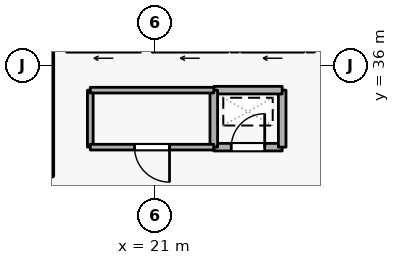
"""IFC4 building model, lengths in metres.
Left out: names, types, materials, properties, quantities, classifications, styles, units other than length and angle.
Written with IfcOpenShell. Run it as: python <this file> out.ifc"""

import sys

from ifc_helpers import new_model, si_unit, direction, frame, frame_2d, origin, place, context, subcontext, project, spatial, rectangle, extrude, element, fill, save


model = new_model("IFC4")
c1 = context("Model", 3, precision=1e-05, world=origin(), true_north=direction((0.0, 1.0)))
c2 = subcontext(c1, "Body", "Model", "MODEL_VIEW")
j1 = project(units=[si_unit("LENGTHUNIT", "METRE"), si_unit("PLANEANGLEUNIT", "RADIAN")], contexts=[c1])
p1 = place(None, origin())
s1 = spatial("IfcSite", under=j1, at=p1, CompositionType="ELEMENT")
p2 = place(p1, origin())
s2 = spatial("IfcBuilding", under=s1, at=p2, CompositionType="ELEMENT")
p3 = place(p2, origin())
s3 = spatial("IfcBuildingStorey", under=s2, at=p3, CompositionType="ELEMENT", Elevation=0.0)
p4 = place(p3, frame((24.92, 36.45, 0.0), z_axis=(0.0, 0.0, 1.0), x_axis=(-1.0, 0.0, 0.0)))
e1 = element("IfcWall", 1, at=p4, inside=s3, PredefinedType="STANDARD", context=c2, shape_type="SweptSolid", body=[
    extrude(rectangle(XDim=1.64, YDim=0.2, at=frame_2d((0.82, 0.0))), origin(), (0.0, 0.0, 1.0), 4.46),
])
p5 = place(p4, frame((0.31, 0.0, 0.0)))
e2 = element("IfcOpeningElement", 2, at=p5, cuts=e1, PredefinedType="OPENING", context=c2, shape_type="SweptSolid", body=[
    extrude(rectangle(XDim=1.02, YDim=2.06, at=frame_2d((0.51, 1.03))), frame((0.0, 0.11, 0.0), z_axis=(0.0, -1.0, 0.0), x_axis=(1.0, 0.0, 0.0)), (0.0, 0.0, 1.0), 0.22),
])
p6 = place(p3, frame((22.92, 36.45, 0.0), z_axis=(0.0, 0.0, 1.0), x_axis=(-1.0, 0.0, 0.0)))
e3 = element("IfcWall", 3, at=p6, inside=s3, PredefinedType="STANDARD", context=c2, shape_type="SweptSolid", body=[
    extrude(rectangle(XDim=1.99, YDim=0.2, at=frame_2d((0.995, 0.0))), origin(), (0.0, 0.0, 1.0), 4.46),
])
p7 = place(p6, frame((0.485, 0.0, 0.0)))
e4 = element("IfcOpeningElement", 4, at=p7, cuts=e3, PredefinedType="OPENING", context=c2, shape_type="SweptSolid", body=[
    extrude(rectangle(XDim=1.02, YDim=2.06, at=frame_2d((0.51, 1.03))), frame((0.0, 0.11, 0.0), z_axis=(0.0, -1.0, 0.0), x_axis=(1.0, 0.0, 0.0)), (0.0, 0.0, 1.0), 0.22),
])
p8 = place(p3, frame((20.62, 36.45, 0.0), z_axis=(0.0, 0.0, 1.0), x_axis=(-1.0, 0.0, 0.0)))
e5 = element("IfcWall", 5, at=p8, inside=s3, PredefinedType="STANDARD", context=c2, shape_type="SweptSolid", body=[
    extrude(rectangle(XDim=1.94, YDim=0.2, at=frame_2d((0.97, 0.0))), origin(), (0.0, 0.0, 1.0), 4.46),
])
p9 = place(p8, frame((0.46, 0.0, 0.0)))
e6 = element("IfcOpeningElement", 6, at=p9, cuts=e5, PredefinedType="OPENING", context=c2, shape_type="SweptSolid", body=[
    extrude(rectangle(XDim=1.02, YDim=2.06, at=frame_2d((0.51, 1.03))), frame((0.0, 0.11, 0.0), z_axis=(0.0, -1.0, 0.0), x_axis=(1.0, 0.0, 0.0)), (0.0, 0.0, 1.0), 0.22),
])
p10 = place(p3, frame((22.55, 33.85, 0.0), z_axis=(0.0, 0.0, 1.0), x_axis=(1.0, 0.0, 0.0)))
e7 = element("IfcWall", 7, at=p10, inside=s3, PredefinedType="STANDARD", context=c2, shape_type="SweptSolid", body=[
    extrude(rectangle(XDim=1.8, YDim=0.2, at=frame_2d((0.9, 0.0))), origin(), (0.0, 0.0, 1.0), 4.46),
])
p11 = place(p10, frame((0.46, 0.0, 0.0)))
e8 = element("IfcOpeningElement", 8, at=p11, cuts=e7, PredefinedType="OPENING", context=c2, shape_type="SweptSolid", body=[
    extrude(rectangle(XDim=0.88, YDim=2.04, at=frame_2d((0.44, 1.02))), frame((0.0, 0.11, 0.0), z_axis=(0.0, -1.0, 0.0), x_axis=(1.0, 0.0, 0.0)), (0.0, 0.0, 1.0), 0.22),
])
p12 = place(p3, frame((24.35, 33.85, 0.0), z_axis=(0.0, 0.0, 1.0), x_axis=(0.0, 1.0, 0.0)))
e9 = element("IfcWall", 9, at=p12, inside=s3, PredefinedType="STANDARD", context=c2, shape_type="SweptSolid", body=[
    extrude(rectangle(XDim=1.5, YDim=0.2, at=frame_2d((0.75, 0.0))), origin(), (0.0, 0.0, 1.0), 4.46),
])
p13 = place(p3, frame((24.35, 35.35, 0.0), z_axis=(0.0, 0.0, 1.0), x_axis=(-1.0, 0.0, 0.0)))
e10 = element("IfcWall", 10, at=p13, inside=s3, PredefinedType="STANDARD", context=c2, shape_type="SweptSolid", body=[
    extrude(rectangle(XDim=1.8, YDim=0.2, at=frame_2d((0.9, 0.0))), origin(), (0.0, 0.0, 1.0), 4.46),
])
p14 = place(p3, frame((22.55, 35.35, 0.0), z_axis=(0.0, 0.0, 1.0), x_axis=(0.0, -1.0, 0.0)))
e11 = element("IfcWall", 11, at=p14, inside=s3, PredefinedType="STANDARD", context=c2, shape_type="SweptSolid", body=[
    extrude(rectangle(XDim=1.5, YDim=0.2, at=frame_2d((0.75, 0.0))), origin(), (0.0, 0.0, 1.0), 4.46),
])
p15 = place(p3, frame((19.3, 33.85, 0.0), z_axis=(0.0, 0.0, 1.0), x_axis=(0.0, 1.0, 0.0)))
e12 = element("IfcWall", 12, at=p15, inside=s3, PredefinedType="PARTITIONING", context=c2, shape_type="SweptSolid", body=[
    extrude(rectangle(XDim=1.5, YDim=0.15, at=frame_2d((0.75, 0.0))), origin(), (0.0, 0.0, 1.0), 4.46),
])
p16 = place(p3, frame((19.3, 35.35, 0.0), z_axis=(0.0, 0.0, 1.0), x_axis=(1.0, 0.0, 0.0)))
e13 = element("IfcWall", 13, at=p16, inside=s3, PredefinedType="PARTITIONING", context=c2, shape_type="SweptSolid", body=[
    extrude(rectangle(XDim=3.25, YDim=0.15, at=frame_2d((1.625, 0.0))), origin(), (0.0, 0.0, 1.0), 4.46),
])
p17 = place(p3, frame((22.55, 33.85, 0.0), z_axis=(0.0, 0.0, 1.0), x_axis=(-1.0, 0.0, 0.0)))
e14 = element("IfcWall", 14, at=p17, inside=s3, PredefinedType="PARTITIONING", context=c2, shape_type="SweptSolid", body=[
    extrude(rectangle(XDim=3.25, YDim=0.15, at=frame_2d((1.625, 0.0))), origin(), (0.0, 0.0, 1.0), 4.46),
])
p18 = place(p17, frame((1.165, 0.0, 0.0)))
e15 = element("IfcOpeningElement", 15, at=p18, cuts=e14, PredefinedType="OPENING", context=c2, shape_type="SweptSolid", body=[
    extrude(rectangle(XDim=0.92, YDim=2.08, at=frame_2d((0.46, 1.04))), frame((0.0, 0.085, 0.0), z_axis=(0.0, -1.0, 0.0), x_axis=(1.0, 0.0, 0.0)), (0.0, 0.0, 1.0), 0.17),
])
p19 = place(p11, origin())
e16 = element("IfcDoor", 16, at=p19, inside=s3, OperationType="SINGLE_SWING_RIGHT", PredefinedType="DOOR", context=c2, shape_type="SweptSolid", body=[
    extrude(rectangle(XDim=0.88, YDim=2.04, at=frame_2d((0.44, 1.02))), frame((0.0, 0.025, 0.0), z_axis=(0.0, -1.0, 0.0), x_axis=(1.0, 0.0, 0.0)), (0.0, 0.0, 1.0), 0.05),
])
fill(e8, e16)
p20 = place(p18, origin())
e17 = element("IfcDoor", 17, at=p20, inside=s3, OperationType="SINGLE_SWING_LEFT", PredefinedType="DOOR", context=c2, shape_type="SweptSolid", body=[
    extrude(rectangle(XDim=0.92, YDim=2.08, at=frame_2d((0.46, 1.04))), frame((0.0, 0.025, 0.0), z_axis=(0.0, -1.0, 0.0), x_axis=(1.0, 0.0, 0.0)), (0.0, 0.0, 1.0), 0.05),
])
fill(e15, e17)
save(model, sys.argv[1])
